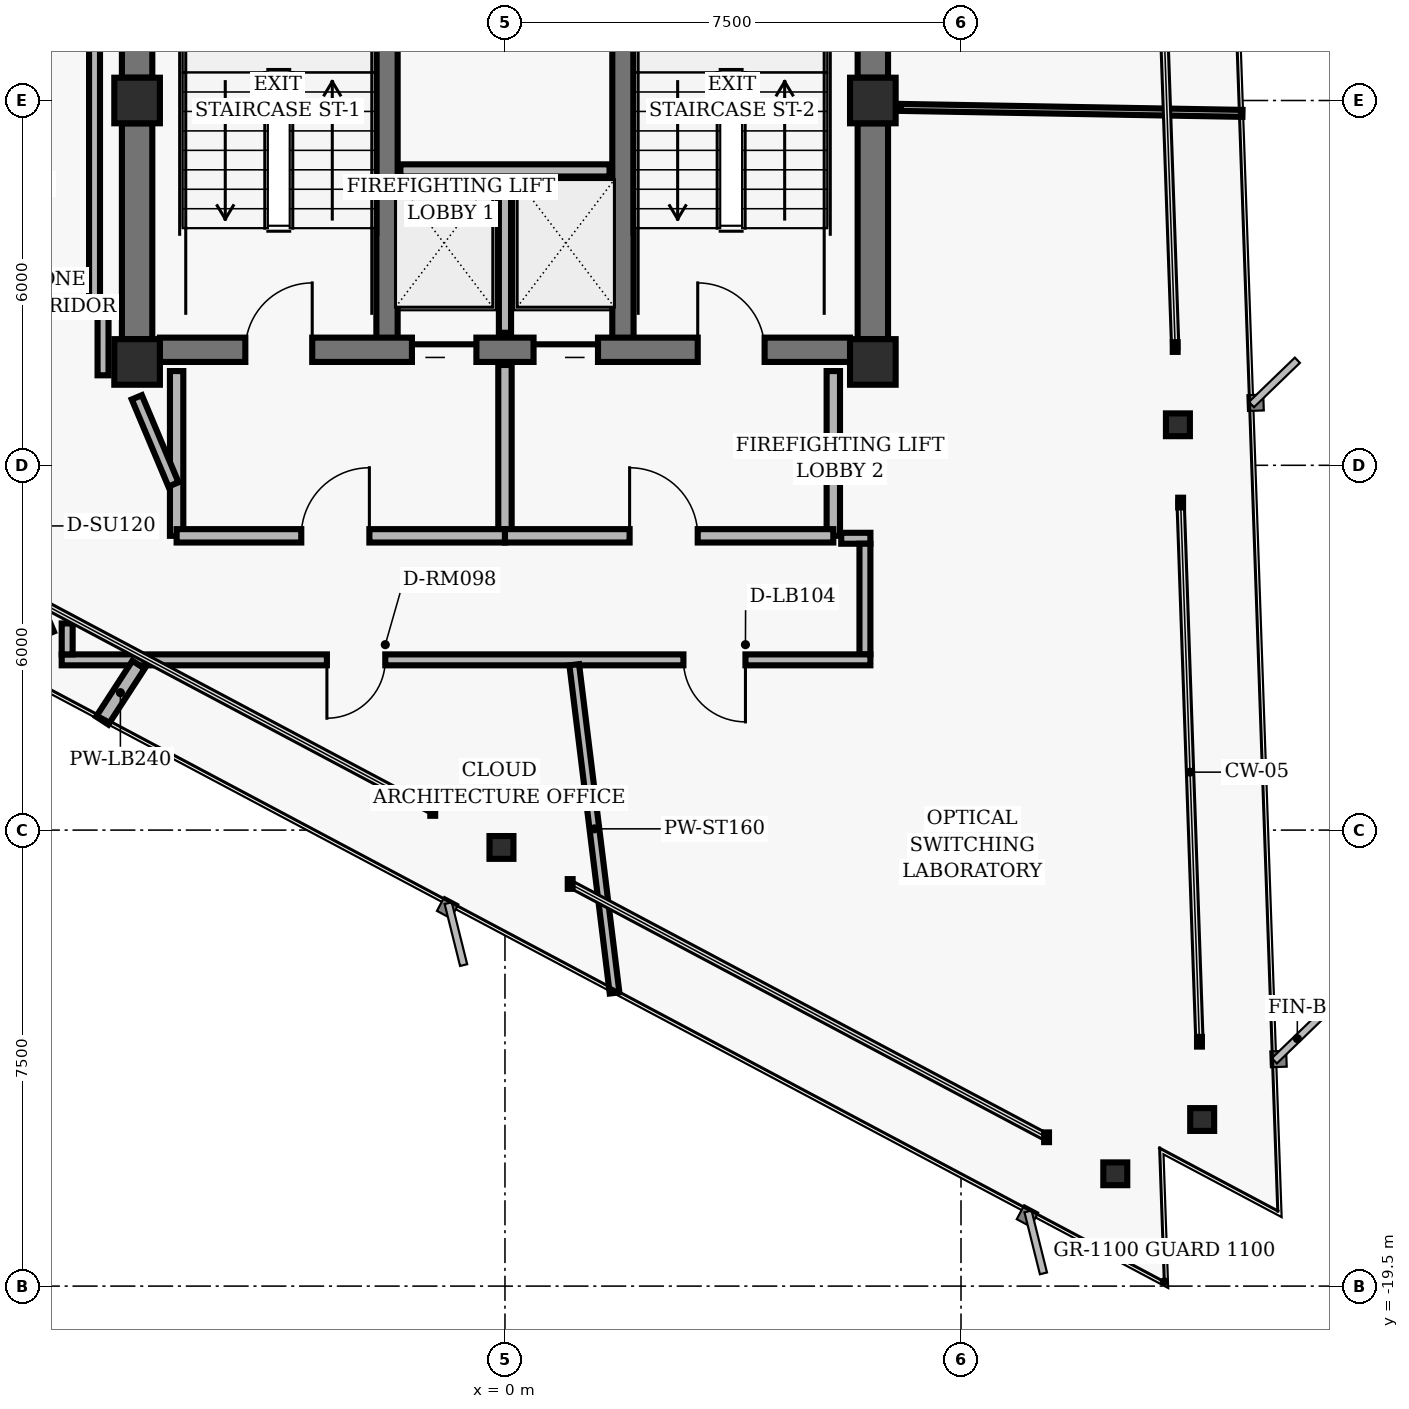
"""IFC4 building model, lengths in metres.
Left out: names, types, materials, properties, quantities, classifications, styles, units other than length and angle.
Written with IfcOpenShell. Run it as: python <this file> out.ifc"""

import sys

from ifc_helpers import new_model, si_unit, direction, frame, frame_2d, origin, origin_2d, place, context, subcontext, project, spatial, rectangle, hollow_rectangle, i_section, extrude, element, fill, save


model = new_model("IFC4")
c1 = context("Model", 3, precision=1e-05, world=origin(), true_north=direction((0.0, 1.0)))
c2 = subcontext(c1, "Body", "Model", "MODEL_VIEW")
j1 = project(units=[si_unit("LENGTHUNIT", "METRE"), si_unit("PLANEANGLEUNIT", "RADIAN")], contexts=[c1])
p1 = place(None, origin())
s1 = spatial("IfcSite", under=j1, at=p1, CompositionType="ELEMENT")
p2 = place(p1, origin())
s2 = spatial("IfcBuilding", under=s1, at=p2, CompositionType="ELEMENT")
p3 = place(p2, frame((0.0, 0.0, 211.84)))
s3 = spatial("IfcBuildingStorey", under=s2, at=p3, CompositionType="ELEMENT", Elevation=211.84)
for number, where, z_axis, x_axis in (
    (1, (-6.05, 0.0, 0.0), (0.0, 0.0, 1.0), (1.0, 0.0, 0.0)),
    (2, (6.05, 0.0, 0.0), (0.0, 0.0, 1.0), (1.0, 0.0, 0.0)),
    (3, (-6.05, -4.3, 0.0), (0.0, 0.0, 1.0), (1.0, 0.0, 0.0)),
    (4, (6.05, -4.3, 0.0), (0.0, 0.0, 1.0), (1.0, 0.0, 0.0)),
):
    element("IfcColumn", number, at=place(p3, frame(where, z_axis=z_axis, x_axis=x_axis)), inside=s3, PredefinedType="COLUMN", context=c2, shape_type="SweptSolid", body=[
        extrude(hollow_rectangle(XDim=0.75, YDim=0.75, WallThickness=0.05, InnerFilletRadius=0.02, OuterFilletRadius=0.04, at=origin_2d()), origin(), (0.0, 0.0, 1.0), 3.04),
    ])
p4 = place(p3, frame((-6.05, 0.375, 0.0), z_axis=(0.0, 0.0, 1.0), x_axis=(0.0, 1.0, 0.0)))
e5 = element("IfcWall", 5, at=p4, inside=s3, PredefinedType="SHEAR", context=c2, shape_type="SweptSolid", body=[
    extrude(rectangle(XDim=3.75, YDim=0.5, at=frame_2d((1.875, 0.0))), origin(), (0.0, 0.0, 1.0), 2.618),
])
p5 = place(p3, frame((-6.05, -3.925, 0.0), z_axis=(0.0, 0.0, 1.0), x_axis=(0.0, 1.0, 0.0)))
e6 = element("IfcWall", 6, at=p5, inside=s3, PredefinedType="SHEAR", context=c2, shape_type="SweptSolid", body=[
    extrude(rectangle(XDim=3.55, YDim=0.5, at=frame_2d((1.775, 0.0))), origin(), (0.0, 0.0, 1.0), 2.618),
])
p6 = place(p3, frame((6.05, 0.375, 0.0), z_axis=(0.0, 0.0, 1.0), x_axis=(0.0, 1.0, 0.0)))
e7 = element("IfcWall", 7, at=p6, inside=s3, PredefinedType="SHEAR", context=c2, shape_type="SweptSolid", body=[
    extrude(rectangle(XDim=3.75, YDim=0.5, at=frame_2d((1.875, 0.0))), origin(), (0.0, 0.0, 1.0), 2.618),
])
p7 = place(p3, frame((6.05, -3.925, 0.0), z_axis=(0.0, 0.0, 1.0), x_axis=(0.0, 1.0, 0.0)))
e8 = element("IfcWall", 8, at=p7, inside=s3, PredefinedType="SHEAR", context=c2, shape_type="SweptSolid", body=[
    extrude(rectangle(XDim=3.55, YDim=0.5, at=frame_2d((1.775, 0.0))), origin(), (0.0, 0.0, 1.0), 2.618),
])
for number, where, z_axis, x_axis in (
    (9, (-1.94, -4.1, 0.0), (0.0, 0.0, 1.0), (0.0, 1.0, 0.0)),
    (10, (1.94, -4.1, 0.0), (0.0, 0.0, 1.0), (0.0, 1.0, 0.0)),
):
    element("IfcWall", number, at=place(p3, frame(where, z_axis=z_axis, x_axis=x_axis)), inside=s3, PredefinedType="SHEAR", context=c2, shape_type="SweptSolid", body=[
        extrude(rectangle(XDim=8.2, YDim=0.35, at=frame_2d((4.1, 0.0))), origin(), (0.0, 0.0, 1.0), 2.618),
    ])
p8 = place(p3, frame((-5.675, -4.1, 0.0), z_axis=(0.0, 0.0, 1.0), x_axis=(1.0, 0.0, 0.0)))
e11 = element("IfcWall", 11, at=p8, inside=s3, PredefinedType="SHEAR", context=c2, shape_type="SweptSolid", body=[
    extrude(rectangle(XDim=11.35, YDim=0.4, at=frame_2d((5.675, 0.0))), origin(), (0.0, 0.0, 1.0), 2.618),
])
p9 = place(p8, frame((1.405, 0.0, 0.0)))
e12 = element("IfcOpeningElement", 12, at=p9, cuts=e11, PredefinedType="OPENING", context=c2, shape_type="SweptSolid", body=[
    extrude(rectangle(XDim=1.1, YDim=2.04, at=frame_2d((0.55, 1.02))), frame((0.0, 0.21, 0.0), z_axis=(0.0, -1.0, 0.0), x_axis=(1.0, 0.0, 0.0)), (0.0, 0.0, 1.0), 0.42),
])
p10 = place(p8, frame((8.845, 0.0, 0.0)))
e13 = element("IfcOpeningElement", 13, at=p10, cuts=e11, PredefinedType="OPENING", context=c2, shape_type="SweptSolid", body=[
    extrude(rectangle(XDim=1.1, YDim=2.04, at=frame_2d((0.55, 1.02))), frame((0.0, 0.21, 0.0), z_axis=(0.0, -1.0, 0.0), x_axis=(1.0, 0.0, 0.0)), (0.0, 0.0, 1.0), 0.42),
])
p11 = place(p8, frame((4.145, 0.0, 0.0)))
e14 = element("IfcOpeningElement", 14, at=p11, cuts=e11, PredefinedType="OPENING", context=c2, shape_type="SweptSolid", body=[
    extrude(rectangle(XDim=1.06, YDim=2.04, at=frame_2d((0.53, 1.02))), frame((0.0, 0.21, 0.0), z_axis=(0.0, -1.0, 0.0), x_axis=(1.0, 0.0, 0.0)), (0.0, 0.0, 1.0), 0.42),
])
p12 = place(p8, frame((6.145, 0.0, 0.0)))
e15 = element("IfcOpeningElement", 15, at=p12, cuts=e11, PredefinedType="OPENING", context=c2, shape_type="SweptSolid", body=[
    extrude(rectangle(XDim=1.06, YDim=2.04, at=frame_2d((0.53, 1.02))), frame((0.0, 0.21, 0.0), z_axis=(0.0, -1.0, 0.0), x_axis=(1.0, 0.0, 0.0)), (0.0, 0.0, 1.0), 0.42),
])
for number, where, z_axis, x_axis in (
    (16, (11.466, -16.76, 0.0), (0.0, 0.0, 1.0), (1.0, 0.0, 0.0)),
    (17, (11.067, -5.334, 0.0), (0.0, 0.0, 1.0), (1.0, 0.0, 0.0)),
    (18, (-0.058, -12.285, 0.0), (0.0, 0.0, 1.0), (1.0, 0.0, 0.0)),
    (19, (10.037, -17.653, 0.0), (0.0, 0.0, 1.0), (1.0, 0.0, 0.0)),
):
    element("IfcColumn", number, at=place(p3, frame(where, z_axis=z_axis, x_axis=x_axis)), inside=s3, PredefinedType="COLUMN", context=c2, shape_type="SweptSolid", body=[
        extrude(i_section(OverallWidth=0.394, OverallDepth=0.375, WebThickness=0.017, FlangeThickness=0.028, FilletRadius=0.016, at=origin_2d()), origin(), (0.0, 0.0, 1.0), 3.04),
    ])
p13 = place(p3, frame((0.0, -3.82, 0.0), z_axis=(0.0, 0.0, 1.0), x_axis=(0.0, 1.0, 0.0)))
e20 = element("IfcWall", 20, at=p13, inside=s3, PredefinedType="PARTITIONING", context=c2, shape_type="SweptSolid", body=[
    extrude(rectangle(XDim=2.67, YDim=0.2, at=frame_2d((1.335, 0.0))), origin(), (0.0, 0.0, 1.0), 2.593),
])
p14 = place(p3, frame((-1.72, -1.15, 0.0), z_axis=(0.0, 0.0, 1.0), x_axis=(1.0, 0.0, 0.0)))
e21 = element("IfcWall", 21, at=p14, inside=s3, PredefinedType="PARTITIONING", context=c2, shape_type="SweptSolid", body=[
    extrude(rectangle(XDim=3.44, YDim=0.2, at=frame_2d((1.72, 0.0))), origin(), (0.0, 0.0, 1.0), 2.593),
])
for number, where, z_axis, x_axis in (
    (22, (-5.4, -7.16, 0.0), (0.0, 0.0, 1.0), (0.0, 1.0, 0.0)),
    (23, (5.4, -7.16, 0.0), (0.0, 0.0, 1.0), (0.0, 1.0, 0.0)),
):
    element("IfcWall", number, at=place(p3, frame(where, z_axis=z_axis, x_axis=x_axis)), inside=s3, PredefinedType="PARTITIONING", context=c2, shape_type="SweptSolid", body=[
        extrude(rectangle(XDim=2.71, YDim=0.22, at=frame_2d((1.355, 0.0))), origin(), (0.0, 0.0, 1.0), 2.593),
    ])
p15 = place(p3, frame((0.0, -7.16, 0.0), z_axis=(0.0, 0.0, 1.0), x_axis=(0.0, 1.0, 0.0)))
e24 = element("IfcWall", 24, at=p15, inside=s3, PredefinedType="PARTITIONING", context=c2, shape_type="SweptSolid", body=[
    extrude(rectangle(XDim=2.81, YDim=0.22, at=frame_2d((1.405, 0.0))), origin(), (0.0, 0.0, 1.0), 2.593),
])
p16 = place(p3, frame((-5.4, -7.16, 0.0), z_axis=(0.0, 0.0, 1.0), x_axis=(1.0, 0.0, 0.0)))
e25 = element("IfcWall", 25, at=p16, inside=s3, PredefinedType="PARTITIONING", context=c2, shape_type="SweptSolid", body=[
    extrude(rectangle(XDim=5.4, YDim=0.22, at=frame_2d((2.7, 0.0))), origin(), (0.0, 0.0, 1.0), 2.215),
])
p17 = place(p16, frame((2.05, 0.0, 0.0)))
e26 = element("IfcOpeningElement", 26, at=p17, cuts=e25, PredefinedType="OPENING", context=c2, shape_type="SweptSolid", body=[
    extrude(rectangle(XDim=1.12, YDim=2.02, at=frame_2d((0.56, 1.01))), frame((0.0, 0.12, 0.0), z_axis=(0.0, -1.0, 0.0), x_axis=(1.0, 0.0, 0.0)), (0.0, 0.0, 1.0), 0.24),
])
p18 = place(p3, frame((0.0, -7.16, 0.0), z_axis=(0.0, 0.0, 1.0), x_axis=(1.0, 0.0, 0.0)))
e27 = element("IfcWall", 27, at=p18, inside=s3, PredefinedType="PARTITIONING", context=c2, shape_type="SweptSolid", body=[
    extrude(rectangle(XDim=5.4, YDim=0.22, at=frame_2d((2.7, 0.0))), origin(), (0.0, 0.0, 1.0), 2.593),
])
p19 = place(p18, frame((2.05, 0.0, 0.0)))
e28 = element("IfcOpeningElement", 28, at=p19, cuts=e27, PredefinedType="OPENING", context=c2, shape_type="SweptSolid", body=[
    extrude(rectangle(XDim=1.12, YDim=2.02, at=frame_2d((0.56, 1.01))), frame((0.0, 0.12, 0.0), z_axis=(0.0, -1.0, 0.0), x_axis=(1.0, 0.0, 0.0)), (0.0, 0.0, 1.0), 0.24),
])
p20 = place(p3, frame((-7.501, -8.769, 0.0), z_axis=(0.0, 0.0, 1.0), x_axis=(-0.387573945081, 0.921838617706, 0.0)))
e29 = element("IfcWall", 29, at=p20, inside=s3, PredefinedType="PARTITIONING", context=c2, shape_type="SweptSolid", body=[
    extrude(rectangle(XDim=4.813, YDim=0.18, at=frame_2d((2.407, 0.0))), origin(), (0.0, 0.0, 1.0), 2.593),
])
p21 = place(p20, frame((1.817, 0.0, 0.0)))
e30 = element("IfcOpeningElement", 30, at=p21, cuts=e29, PredefinedType="OPENING", context=c2, shape_type="SweptSolid", body=[
    extrude(rectangle(XDim=1.18, YDim=2.02, at=frame_2d((0.59, 1.01))), frame((0.0, 0.1, 0.0), z_axis=(0.0, -1.0, 0.0), x_axis=(1.0, 0.0, 0.0)), (0.0, 0.0, 1.0), 0.2),
])
p22 = place(p3, frame((-6.75, 3.273, 0.0), z_axis=(0.0, 0.0, 1.0), x_axis=(0.0, -1.0, 0.0)))
e31 = element("IfcWall", 31, at=p22, inside=s3, PredefinedType="PARTITIONING", context=c2, shape_type="SweptSolid", body=[
    extrude(rectangle(XDim=6.547, YDim=0.18, at=frame_2d((3.273, 0.0))), origin(), (0.0, 0.0, 1.0), 2.593),
])
p23 = place(p3, frame((-6.61, -3.541, 0.0), z_axis=(0.0, 0.0, 1.0), x_axis=(0.0, -1.0, 0.0)))
e32 = element("IfcWall", 32, at=p23, inside=s3, PredefinedType="PARTITIONING", context=c2, shape_type="SweptSolid", body=[
    extrude(rectangle(XDim=0.979, YDim=0.18, at=frame_2d((0.489, 0.0))), origin(), (0.0, 0.0, 1.0), 2.593),
])
p24 = place(p3, frame((-6.055, -4.882, 0.0), z_axis=(0.0, 0.0, 1.0), x_axis=(0.387579540458, -0.921836265189, 0.0)))
e33 = element("IfcWall", 33, at=p24, inside=s3, PredefinedType="PARTITIONING", context=c2, shape_type="SweptSolid", body=[
    extrude(rectangle(XDim=1.555, YDim=0.18, at=frame_2d((0.777, 0.0))), origin(), (0.0, 0.0, 1.0), 2.073),
])
p25 = place(p3, frame((5.53, -7.2, 0.0), z_axis=(0.0, 0.0, 1.0), x_axis=(1.0, 0.0, 0.0)))
e34 = element("IfcWall", 34, at=p25, inside=s3, PredefinedType="PARTITIONING", context=c2, shape_type="SweptSolid", body=[
    extrude(rectangle(XDim=0.48, YDim=0.18, at=frame_2d((0.24, 0.0))), origin(), (0.0, 0.0, 1.0), 2.593),
])
p26 = place(p3, frame((5.92, -7.29, 0.0), z_axis=(0.0, 0.0, 1.0), x_axis=(0.0, -1.0, 0.0)))
e35 = element("IfcWall", 35, at=p26, inside=s3, PredefinedType="PARTITIONING", context=c2, shape_type="SweptSolid", body=[
    extrude(rectangle(XDim=1.82, YDim=0.18, at=frame_2d((0.91, 0.0))), origin(), (0.0, 0.0, 1.0), 2.593),
])
p27 = place(p3, frame((6.01, -9.2, 0.0), z_axis=(0.0, 0.0, 1.0), x_axis=(-1.0, 0.0, 0.0)))
e36 = element("IfcWall", 36, at=p27, inside=s3, PredefinedType="PARTITIONING", context=c2, shape_type="SweptSolid", body=[
    extrude(rectangle(XDim=13.3, YDim=0.18, at=frame_2d((6.65, 0.0))), origin(), (0.0, 0.0, 1.0), 2.215),
])
p28 = place(p27, frame((7.979, 0.0, 0.0)))
e37 = element("IfcOpeningElement", 37, at=p28, cuts=e36, PredefinedType="OPENING", context=c2, shape_type="SweptSolid", body=[
    extrude(rectangle(XDim=0.96, YDim=2.02, at=frame_2d((0.48, 1.01))), frame((0.0, 0.1, 0.0), z_axis=(0.0, -1.0, 0.0), x_axis=(1.0, 0.0, 0.0)), (0.0, 0.0, 1.0), 0.2),
])
p29 = place(p27, frame((2.055, 0.0, 0.0)))
e38 = element("IfcOpeningElement", 38, at=p29, cuts=e36, PredefinedType="OPENING", context=c2, shape_type="SweptSolid", body=[
    extrude(rectangle(XDim=1.02, YDim=2.02, at=frame_2d((0.51, 1.01))), frame((0.0, 0.1, 0.0), z_axis=(0.0, -1.0, 0.0), x_axis=(1.0, 0.0, 0.0)), (0.0, 0.0, 1.0), 0.2),
])
p30 = place(p3, frame((-7.2, -9.11, 0.0), z_axis=(0.0, 0.0, 1.0), x_axis=(0.0, 1.0, 0.0)))
e39 = element("IfcWall", 39, at=p30, inside=s3, PredefinedType="PARTITIONING", context=c2, shape_type="SweptSolid", body=[
    extrude(rectangle(XDim=0.51, YDim=0.18, at=frame_2d((0.255, 0.0))), origin(), (0.0, 0.0, 1.0), 2.593),
])
p31 = place(p3, frame((-6.027, -9.28, 0.0), z_axis=(0.0, 0.0, 1.0), x_axis=(-0.544526030547, -0.838743943082, 0.0)))
e40 = element("IfcWall", 40, at=p31, inside=s3, PredefinedType="PARTITIONING", context=c2, shape_type="SweptSolid", body=[
    extrude(rectangle(XDim=1.095, YDim=0.24, at=frame_2d((0.548, 0.0))), origin(), (0.0, 0.0, 1.0), 2.593),
])
p32 = place(p3, frame((1.139, -9.28, 0.0), z_axis=(0.0, 0.0, 1.0), x_axis=(0.121863374105, -0.992546884561, 0.0)))
e41 = element("IfcWall", 41, at=p32, inside=s3, PredefinedType="PARTITIONING", context=c2, shape_type="SweptSolid", body=[
    extrude(rectangle(XDim=5.439, YDim=0.16, at=frame_2d((2.72, 0.0))), origin(), (0.0, 0.0, 1.0), 2.593),
])
p33 = place(p3, frame((6.51, -0.114, 0.0), z_axis=(0.0, 0.0, 1.0), x_axis=(0.999847502382, -0.017463446992, 0.0)))
e42 = element("IfcWall", 42, at=p33, inside=s3, PredefinedType="MOVABLE", context=c2, shape_type="SweptSolid", body=[
    extrude(rectangle(XDim=5.62, YDim=0.115, at=frame_2d((2.81, 0.0))), origin(), (0.0, 0.0, 1.0), 2.593),
])
p34 = place(p9, origin())
e43 = element("IfcDoor", 43, at=p34, inside=s3, OperationType="SINGLE_SWING_RIGHT", PredefinedType="DOOR", context=c2, shape_type="SweptSolid", body=[
    extrude(rectangle(XDim=1.1, YDim=2.04, at=frame_2d((0.55, 1.02))), frame((0.0, 0.025, 0.0), z_axis=(0.0, -1.0, 0.0), x_axis=(1.0, 0.0, 0.0)), (0.0, 0.0, 1.0), 0.05),
])
fill(e12, e43)
p35 = place(p10, origin())
e44 = element("IfcDoor", 44, at=p35, inside=s3, OperationType="SINGLE_SWING_LEFT", PredefinedType="DOOR", context=c2, shape_type="SweptSolid", body=[
    extrude(rectangle(XDim=1.1, YDim=2.04, at=frame_2d((0.55, 1.02))), frame((0.0, 0.025, 0.0), z_axis=(0.0, -1.0, 0.0), x_axis=(1.0, 0.0, 0.0)), (0.0, 0.0, 1.0), 0.05),
])
fill(e13, e44)
p36 = place(p11, origin())
e45 = element("IfcDoor", 45, at=p36, inside=s3, OperationType="SLIDING_TO_LEFT", PredefinedType="DOOR", context=c2, shape_type="SweptSolid", body=[
    extrude(rectangle(XDim=1.06, YDim=2.04, at=frame_2d((0.53, 1.02))), frame((0.0, 0.025, 0.0), z_axis=(0.0, -1.0, 0.0), x_axis=(1.0, 0.0, 0.0)), (0.0, 0.0, 1.0), 0.05),
])
fill(e14, e45)
p37 = place(p12, origin())
e46 = element("IfcDoor", 46, at=p37, inside=s3, OperationType="SLIDING_TO_RIGHT", PredefinedType="DOOR", context=c2, shape_type="SweptSolid", body=[
    extrude(rectangle(XDim=1.06, YDim=2.04, at=frame_2d((0.53, 1.02))), frame((0.0, 0.025, 0.0), z_axis=(0.0, -1.0, 0.0), x_axis=(1.0, 0.0, 0.0)), (0.0, 0.0, 1.0), 0.05),
])
fill(e15, e46)
p38 = place(p17, origin())
e47 = element("IfcDoor", 47, at=p38, inside=s3, OperationType="SINGLE_SWING_RIGHT", PredefinedType="DOOR", context=c2, shape_type="SweptSolid", body=[
    extrude(rectangle(XDim=1.12, YDim=2.02, at=frame_2d((0.56, 1.01))), frame((0.0, 0.025, 0.0), z_axis=(0.0, -1.0, 0.0), x_axis=(1.0, 0.0, 0.0)), (0.0, 0.0, 1.0), 0.05),
])
fill(e26, e47)
p39 = place(p19, origin())
e48 = element("IfcDoor", 48, at=p39, inside=s3, OperationType="SINGLE_SWING_LEFT", PredefinedType="DOOR", context=c2, shape_type="SweptSolid", body=[
    extrude(rectangle(XDim=1.12, YDim=2.02, at=frame_2d((0.56, 1.01))), frame((0.0, 0.025, 0.0), z_axis=(0.0, -1.0, 0.0), x_axis=(1.0, 0.0, 0.0)), (0.0, 0.0, 1.0), 0.05),
])
fill(e28, e48)
p40 = place(p28, origin())
e49 = element("IfcDoor", 49, at=p40, inside=s3, OperationType="SINGLE_SWING_RIGHT", PredefinedType="DOOR", context=c2, shape_type="SweptSolid", body=[
    extrude(rectangle(XDim=0.96, YDim=2.02, at=frame_2d((0.48, 1.01))), frame((0.0, 0.025, 0.0), z_axis=(0.0, -1.0, 0.0), x_axis=(1.0, 0.0, 0.0)), (0.0, 0.0, 1.0), 0.05),
])
fill(e37, e49)
p41 = place(p29, origin())
e50 = element("IfcDoor", 50, at=p41, inside=s3, OperationType="SINGLE_SWING_LEFT", PredefinedType="DOOR", context=c2, shape_type="SweptSolid", body=[
    extrude(rectangle(XDim=1.02, YDim=2.02, at=frame_2d((0.51, 1.01))), frame((0.0, 0.025, 0.0), z_axis=(0.0, -1.0, 0.0), x_axis=(1.0, 0.0, 0.0)), (0.0, 0.0, 1.0), 0.05),
])
fill(e38, e50)
save(model, sys.argv[1])
